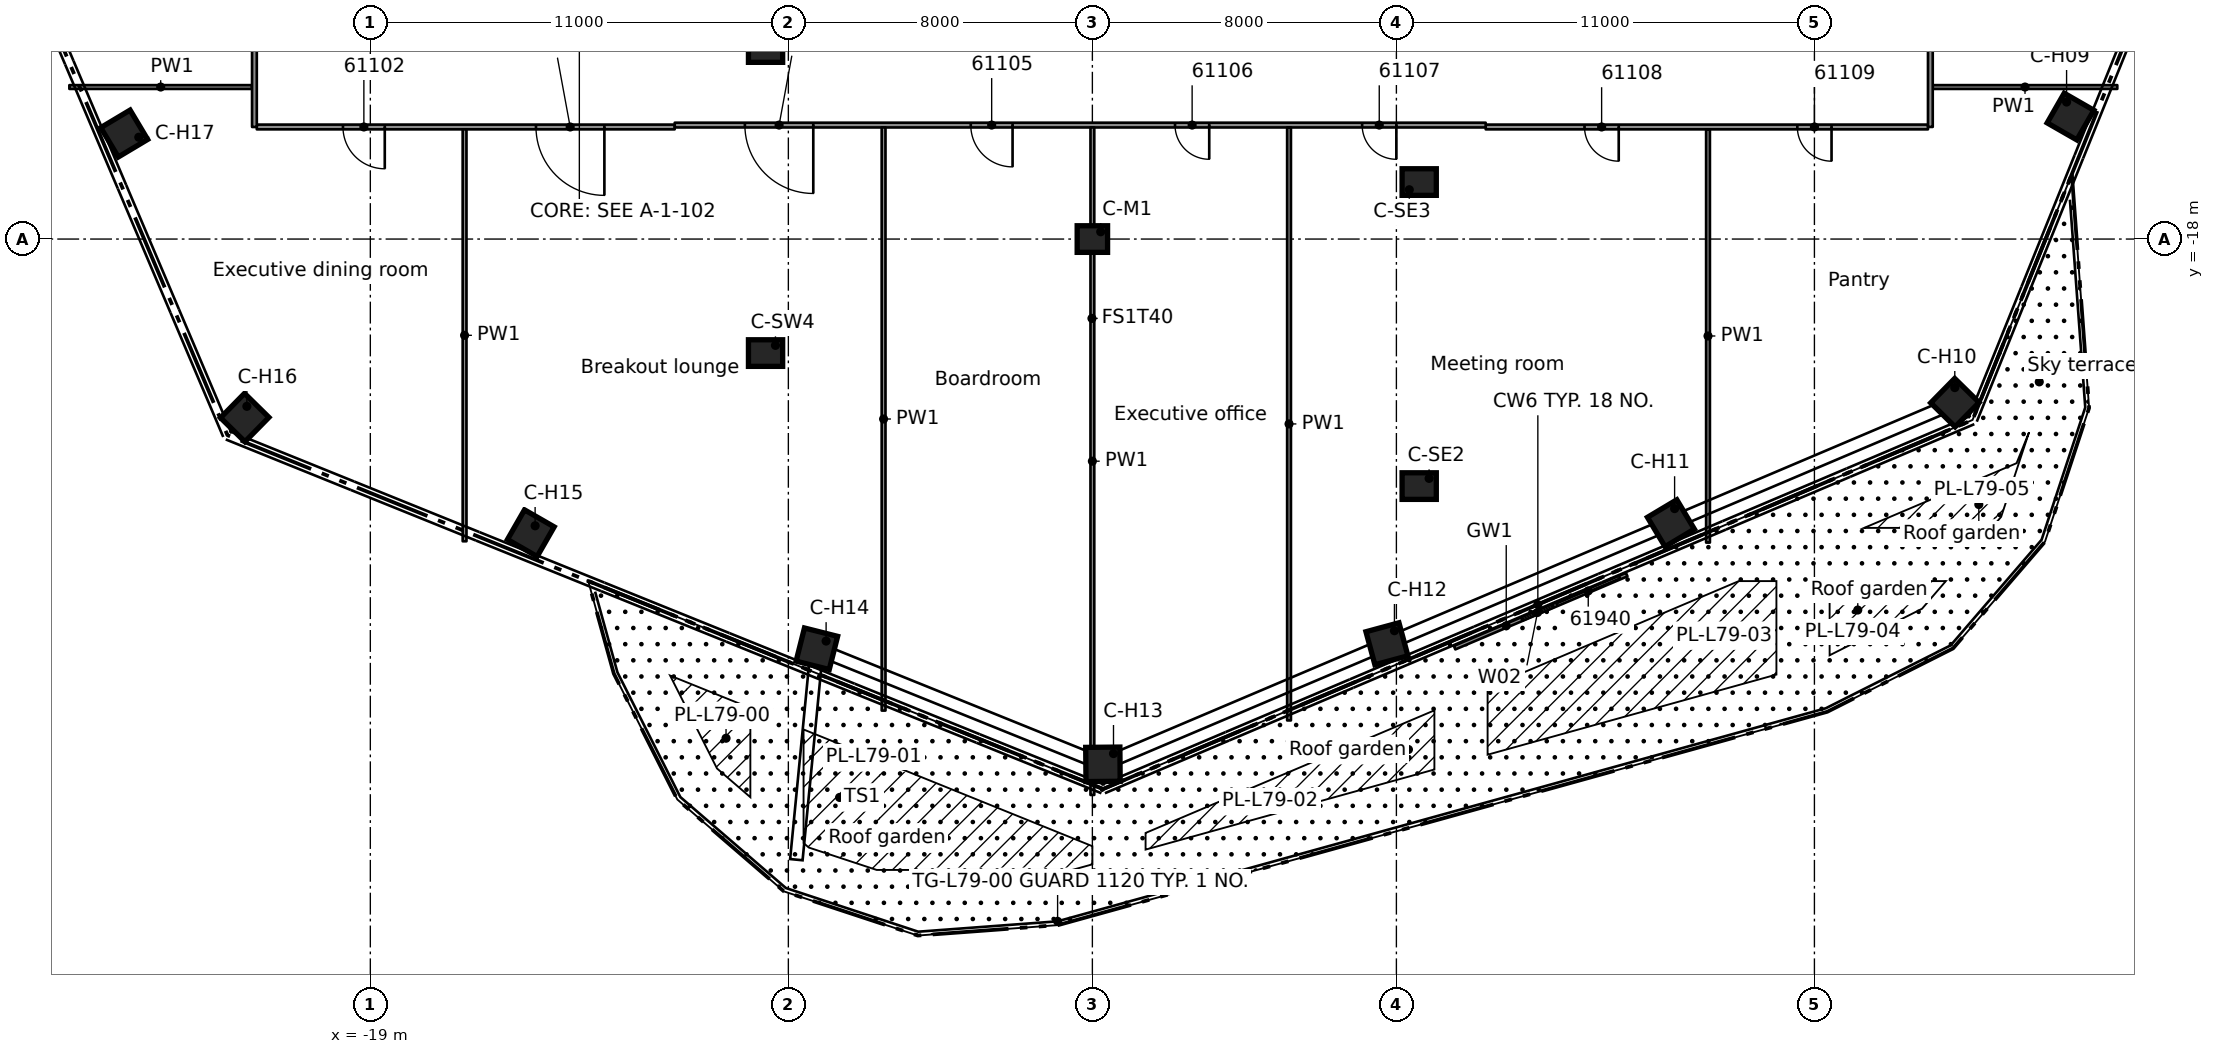
"""IFC4 building model, lengths in metres.
Left out: names, types, materials, properties, quantities, classifications, styles, units other than length and angle.
Written with IfcOpenShell. Run it as: python <this file> out.ifc"""

import sys

from ifc_helpers import new_model, si_unit, direction, frame, frame_2d, origin, origin_2d, place, context, subcontext, project, spatial, rectangle, extrude, element, fill, save


model = new_model("IFC4")
c1 = context("Model", 3, precision=1e-05, world=origin(), true_north=direction((0.0, 1.0)))
c2 = subcontext(c1, "Body", "Model", "MODEL_VIEW")
j1 = project(units=[si_unit("LENGTHUNIT", "METRE"), si_unit("PLANEANGLEUNIT", "RADIAN")], contexts=[c1])
p1 = place(None, origin())
s1 = spatial("IfcSite", under=j1, at=p1, CompositionType="ELEMENT")
p2 = place(p1, origin())
s2 = spatial("IfcBuilding", under=s1, at=p2, CompositionType="ELEMENT")
p3 = place(p2, frame((0.0, 0.0, 296.4)))
s3 = spatial("IfcBuildingStorey", under=s2, at=p3, CompositionType="ELEMENT", Elevation=296.4)
for number, where, z_axis, x_axis in (
    (1, (25.739, -14.777, 0.0), (0.0, 0.0, 1.0), (0.867, -0.498, 0.0)),
    (2, (22.697, -22.305, 0.0), (0.0, 0.0, 1.0), (0.713, -0.701, 0.0)),
    (3, (15.224, -25.477, 0.0), (0.0, 0.0, 1.0), (0.513, -0.858, 0.0)),
    (4, (7.751, -28.649, 0.0), (0.0, 0.0, 1.0), (0.261, -0.965, 0.0)),
    (5, (0.278, -31.821, 0.0), (0.0, 0.0, 1.0), (0.009, -1.0, 0.0)),
    (6, (-7.25, -28.78, 0.0), (0.0, 0.0, 1.0), (-0.244, -0.97, 0.0)),
    (7, (-14.777, -25.739, 0.0), (0.0, 0.0, 1.0), (-0.498, -0.867, 0.0)),
    (8, (-22.305, -22.697, 0.0), (0.0, 0.0, 1.0), (-0.701, -0.713, 0.0)),
    (9, (-25.477, -15.224, 0.0), (0.0, 0.0, 1.0), (-0.858, -0.513, 0.0)),
):
    element("IfcColumn", number, at=place(p3, frame(where, z_axis=z_axis, x_axis=x_axis)), inside=s3, PredefinedType="COLUMN", context=c2, shape_type="SweptSolid", body=[
        extrude(rectangle(XDim=0.9, YDim=0.9, at=origin_2d()), origin(), (0.0, 0.0, 1.0), 3.5),
    ])
p4 = place(p3, frame((0.0, -18.0, 0.0), z_axis=(0.0, 0.0, 1.0), x_axis=(1.0, 0.0, 0.0)))
e10 = element("IfcColumn", 10, at=p4, inside=s3, PredefinedType="COLUMN", context=c2, shape_type="SweptSolid", body=[
    extrude(rectangle(XDim=0.8, YDim=0.7, at=origin_2d()), origin(), (0.0, 0.0, 1.0), 3.5),
])
for number, where, z_axis, x_axis in (
    (11, (8.6, -24.5, 0.0), (0.0, 0.0, 1.0), (1.0, 0.0, 0.0)),
    (12, (8.6, -16.5, 0.0), (0.0, 0.0, 1.0), (1.0, 0.0, 0.0)),
    (13, (-8.6, -13.0, 0.0), (0.0, 0.0, 1.0), (1.0, 0.0, 0.0)),
    (14, (-8.6, -21.0, 0.0), (0.0, 0.0, 1.0), (1.0, 0.0, 0.0)),
):
    element("IfcColumn", number, at=place(p3, frame(where, z_axis=z_axis, x_axis=x_axis)), inside=s3, PredefinedType="COLUMN", context=c2, shape_type="SweptSolid", body=[
        extrude(rectangle(XDim=0.9, YDim=0.7, at=origin_2d()), origin(), (0.0, 0.0, 1.0), 3.5),
    ])
p5 = place(p3, frame((14.061, -26.829, 0.0), z_axis=(0.0, 0.0, 1.0), x_axis=(-0.920509872574, -0.390719303968, 0.0)))
e15 = element("IfcWall", 15, at=p5, inside=s3, PredefinedType="STANDARD", context=c2, shape_type="SweptSolid", body=[
    extrude(rectangle(XDim=4.921, YDim=0.1, at=frame_2d((2.46, 0.0))), origin(), (0.0, 0.0, 1.0), 3.05),
])
p6 = place(p5, frame((0.2, 0.0, 0.0)))
e16 = element("IfcOpeningElement", 16, at=p6, cuts=e15, PredefinedType="OPENING", context=c2, shape_type="SweptSolid", body=[
    extrude(rectangle(XDim=1.8, YDim=2.4, at=frame_2d((0.9, 1.2))), frame((0.0, 0.06, 0.0), z_axis=(0.0, -1.0, 0.0), x_axis=(1.0, 0.0, 0.0)), (0.0, 0.0, 1.0), 0.12),
])
p7 = place(p5, frame((2.1, 0.0, 0.0)))
e17 = element("IfcOpeningElement", 17, at=p7, cuts=e15, PredefinedType="OPENING", context=c2, shape_type="SweptSolid", body=[
    extrude(rectangle(XDim=0.9, YDim=2.4, at=frame_2d((0.45, 1.2))), frame((0.0, 0.06, 0.0), z_axis=(0.0, -1.0, 0.0), x_axis=(1.0, 0.0, 0.0)), (0.0, 0.0, 1.0), 0.12),
])
p8 = place(p3, frame((-10.991, -15.051, 0.0), z_axis=(0.0, 0.0, 1.0), x_axis=(-1.0, 0.0, 0.0)))
e18 = element("IfcWall", 18, at=p8, inside=s3, PredefinedType="PARTITIONING", context=c2, shape_type="SweptSolid", body=[
    extrude(rectangle(XDim=10.997, YDim=0.125, at=frame_2d((5.499, 0.0))), origin(), (0.0, 0.0, 1.0), 3.03),
])
p9 = place(p8, frame((7.629, 0.0, 0.0)))
e19 = element("IfcOpeningElement", 19, at=p9, cuts=e18, PredefinedType="OPENING", context=c2, shape_type="SweptSolid", body=[
    extrude(rectangle(XDim=1.1, YDim=2.1, at=frame_2d((0.55, 1.05))), frame((0.0, 0.073, 0.0), z_axis=(0.0, -1.0, 0.0), x_axis=(1.0, 0.0, 0.0)), (0.0, 0.0, 1.0), 0.145),
])
p10 = place(p8, frame((1.85, 0.0, 0.0)))
e20 = element("IfcOpeningElement", 20, at=p10, cuts=e18, PredefinedType="OPENING", context=c2, shape_type="SweptSolid", body=[
    extrude(rectangle(XDim=1.8, YDim=2.1, at=frame_2d((0.9, 1.05))), frame((0.0, 0.073, 0.0), z_axis=(0.0, -1.0, 0.0), x_axis=(1.0, 0.0, 0.0)), (0.0, 0.0, 1.0), 0.145),
])
p11 = place(p3, frame((21.988, -15.051, 0.0), z_axis=(0.0, 0.0, 1.0), x_axis=(-1.0, 0.0, 0.0)))
e21 = element("IfcWall", 21, at=p11, inside=s3, PredefinedType="PARTITIONING", context=c2, shape_type="SweptSolid", body=[
    extrude(rectangle(XDim=11.638, YDim=0.125, at=frame_2d((5.819, 0.0))), origin(), (0.0, 0.0, 1.0), 3.03),
])
p12 = place(p11, frame((8.137, 0.0, 0.0)))
e22 = element("IfcOpeningElement", 22, at=p12, cuts=e21, PredefinedType="OPENING", context=c2, shape_type="SweptSolid", body=[
    extrude(rectangle(XDim=0.9, YDim=2.1, at=frame_2d((0.45, 1.05))), frame((0.0, 0.073, 0.0), z_axis=(0.0, -1.0, 0.0), x_axis=(1.0, 0.0, 0.0)), (0.0, 0.0, 1.0), 0.145),
])
p13 = place(p11, frame((2.538, 0.0, 0.0)))
e23 = element("IfcOpeningElement", 23, at=p13, cuts=e21, PredefinedType="OPENING", context=c2, shape_type="SweptSolid", body=[
    extrude(rectangle(XDim=0.9, YDim=2.1, at=frame_2d((0.45, 1.05))), frame((0.0, 0.073, 0.0), z_axis=(0.0, -1.0, 0.0), x_axis=(1.0, 0.0, 0.0)), (0.0, 0.0, 1.0), 0.145),
])
p14 = place(p3, frame((10.349, -15.001, 0.0), z_axis=(0.0, 0.0, 1.0), x_axis=(-1.0, 0.0, 0.0)))
e24 = element("IfcWall", 24, at=p14, inside=s3, PredefinedType="PARTITIONING", context=c2, shape_type="SweptSolid", body=[
    extrude(rectangle(XDim=21.339, YDim=0.125, at=frame_2d((10.669, 0.0))), origin(), (0.0, 0.0, 1.0), 3.03),
])
p15 = place(p14, frame((17.693, 0.0, 0.0)))
e25 = element("IfcOpeningElement", 25, at=p15, cuts=e24, PredefinedType="OPENING", context=c2, shape_type="SweptSolid", body=[
    extrude(rectangle(XDim=1.8, YDim=2.1, at=frame_2d((0.9, 1.05))), frame((0.0, 0.073, 0.0), z_axis=(0.0, -1.0, 0.0), x_axis=(1.0, 0.0, 0.0)), (0.0, 0.0, 1.0), 0.145),
])
p16 = place(p14, frame((12.449, 0.0, 0.0)))
e26 = element("IfcOpeningElement", 26, at=p16, cuts=e24, PredefinedType="OPENING", context=c2, shape_type="SweptSolid", body=[
    extrude(rectangle(XDim=1.1, YDim=2.1, at=frame_2d((0.55, 1.05))), frame((0.0, 0.073, 0.0), z_axis=(0.0, -1.0, 0.0), x_axis=(1.0, 0.0, 0.0)), (0.0, 0.0, 1.0), 0.145),
])
p17 = place(p14, frame((7.274, 0.0, 0.0)))
e27 = element("IfcOpeningElement", 27, at=p17, cuts=e24, PredefinedType="OPENING", context=c2, shape_type="SweptSolid", body=[
    extrude(rectangle(XDim=0.9, YDim=2.1, at=frame_2d((0.45, 1.05))), frame((0.0, 0.073, 0.0), z_axis=(0.0, -1.0, 0.0), x_axis=(1.0, 0.0, 0.0)), (0.0, 0.0, 1.0), 0.145),
])
p18 = place(p14, frame((2.35, 0.0, 0.0)))
e28 = element("IfcOpeningElement", 28, at=p18, cuts=e24, PredefinedType="OPENING", context=c2, shape_type="SweptSolid", body=[
    extrude(rectangle(XDim=0.9, YDim=2.1, at=frame_2d((0.45, 1.05))), frame((0.0, 0.073, 0.0), z_axis=(0.0, -1.0, 0.0), x_axis=(1.0, 0.0, 0.0)), (0.0, 0.0, 1.0), 0.145),
])
p19 = place(p3, frame((-26.92, -14.0, 0.0), z_axis=(0.0, 0.0, 1.0), x_axis=(1.0, 0.0, 0.0)))
e29 = element("IfcWall", 29, at=p19, inside=s3, PredefinedType="PARTITIONING", context=c2, shape_type="SweptSolid", body=[
    extrude(rectangle(XDim=4.807, YDim=0.1, at=frame_2d((2.403, 0.0))), origin(), (0.0, 0.0, 1.0), 3.03),
])
p20 = place(p3, frame((22.113, -14.0, 0.0), z_axis=(0.0, 0.0, 1.0), x_axis=(1.0, 0.0, 0.0)))
e30 = element("IfcWall", 30, at=p20, inside=s3, PredefinedType="PARTITIONING", context=c2, shape_type="SweptSolid", body=[
    extrude(rectangle(XDim=4.857, YDim=0.1, at=frame_2d((2.428, 0.0))), origin(), (0.0, 0.0, 1.0), 3.03),
])
p21 = place(p3, frame((22.051, 15.05, 0.0), z_axis=(0.0, 0.0, 1.0), x_axis=(0.0, -1.0, 0.0)))
e31 = element("IfcWall", 31, at=p21, inside=s3, PredefinedType="PARTITIONING", context=c2, shape_type="SweptSolid", body=[
    extrude(rectangle(XDim=30.1, YDim=0.125, at=frame_2d((15.05, 0.0))), origin(), (0.0, 0.0, 1.0), 3.03),
])
p22 = place(p21, frame((25.426, 0.0, 0.0)))
e32 = element("IfcOpeningElement", 32, at=p22, cuts=e31, PredefinedType="OPENING", context=c2, shape_type="SweptSolid", body=[
    extrude(rectangle(XDim=1.1, YDim=2.1, at=frame_2d((0.55, 1.05))), frame((0.0, 0.073, 0.0), z_axis=(0.0, -1.0, 0.0), x_axis=(1.0, 0.0, 0.0)), (0.0, 0.0, 1.0), 0.145),
])
p23 = place(p21, frame((18.65, 0.0, 0.0)))
e33 = element("IfcOpeningElement", 33, at=p23, cuts=e31, PredefinedType="OPENING", context=c2, shape_type="SweptSolid", body=[
    extrude(rectangle(XDim=0.9, YDim=2.1, at=frame_2d((0.45, 1.05))), frame((0.0, 0.073, 0.0), z_axis=(0.0, -1.0, 0.0), x_axis=(1.0, 0.0, 0.0)), (0.0, 0.0, 1.0), 0.145),
])
p24 = place(p21, frame((10.124, 0.0, 0.0)))
e34 = element("IfcOpeningElement", 34, at=p24, cuts=e31, PredefinedType="OPENING", context=c2, shape_type="SweptSolid", body=[
    extrude(rectangle(XDim=1.8, YDim=2.1, at=frame_2d((0.9, 1.05))), frame((0.0, 0.073, 0.0), z_axis=(0.0, -1.0, 0.0), x_axis=(1.0, 0.0, 0.0)), (0.0, 0.0, 1.0), 0.145),
])
p25 = place(p21, frame((3.65, 0.0, 0.0)))
e35 = element("IfcOpeningElement", 35, at=p25, cuts=e31, PredefinedType="OPENING", context=c2, shape_type="SweptSolid", body=[
    extrude(rectangle(XDim=1.0, YDim=2.1, at=frame_2d((0.5, 1.05))), frame((0.0, 0.073, 0.0), z_axis=(0.0, -1.0, 0.0), x_axis=(1.0, 0.0, 0.0)), (0.0, 0.0, 1.0), 0.145),
])
p26 = place(p3, frame((16.2, -25.987, 0.0), z_axis=(0.0, 0.0, 1.0), x_axis=(0.0, 1.0, 0.0)))
e36 = element("IfcWall", 36, at=p26, inside=s3, PredefinedType="PARTITIONING", context=c2, shape_type="SweptSolid", body=[
    extrude(rectangle(XDim=10.873, YDim=0.1, at=frame_2d((5.437, 0.0))), origin(), (0.0, 0.0, 1.0), 3.03),
])
p27 = place(p3, frame((5.175, -30.666, 0.0), z_axis=(0.0, 0.0, 1.0), x_axis=(0.0, 1.0, 0.0)))
e37 = element("IfcWall", 37, at=p27, inside=s3, PredefinedType="PARTITIONING", context=c2, shape_type="SweptSolid", body=[
    extrude(rectangle(XDim=15.603, YDim=0.1, at=frame_2d((7.802, 0.0))), origin(), (0.0, 0.0, 1.0), 3.03),
])
p28 = place(p3, frame((0.0, -32.627, 0.0), z_axis=(0.0, 0.0, 1.0), x_axis=(0.0, 1.0, 0.0)))
e38 = element("IfcWall", 38, at=p28, inside=s3, PredefinedType="PARTITIONING", context=c2, shape_type="SweptSolid", body=[
    extrude(rectangle(XDim=17.564, YDim=0.1, at=frame_2d((8.782, 0.0))), origin(), (0.0, 0.0, 1.0), 3.03),
])
p29 = place(p3, frame((-5.494, -30.407, 0.0), z_axis=(0.0, 0.0, 1.0), x_axis=(0.0, 1.0, 0.0)))
e39 = element("IfcWall", 39, at=p29, inside=s3, PredefinedType="PARTITIONING", context=c2, shape_type="SweptSolid", body=[
    extrude(rectangle(XDim=15.344, YDim=0.1, at=frame_2d((7.672, 0.0))), origin(), (0.0, 0.0, 1.0), 3.03),
])
p30 = place(p3, frame((-16.52, -25.952, 0.0), z_axis=(0.0, 0.0, 1.0), x_axis=(0.0, 1.0, 0.0)))
e40 = element("IfcWall", 40, at=p30, inside=s3, PredefinedType="PARTITIONING", context=c2, shape_type="SweptSolid", body=[
    extrude(rectangle(XDim=10.838, YDim=0.1, at=frame_2d((5.419, 0.0))), origin(), (0.0, 0.0, 1.0), 3.03),
])
p31 = place(p3, frame((-22.05, -15.051, 0.0), z_axis=(0.0, 0.0, 1.0), x_axis=(0.0, 1.0, 0.0)))
e41 = element("IfcWall", 41, at=p31, inside=s3, PredefinedType="PARTITIONING", context=c2, shape_type="SweptSolid", body=[
    extrude(rectangle(XDim=30.102, YDim=0.125, at=frame_2d((15.051, 0.0))), origin(), (0.0, 0.0, 1.0), 3.03),
])
p32 = place(p31, frame((14.625, 0.0, 0.0)))
e42 = element("IfcOpeningElement", 42, at=p32, cuts=e41, PredefinedType="OPENING", context=c2, shape_type="SweptSolid", body=[
    extrude(rectangle(XDim=0.9, YDim=2.1, at=frame_2d((0.45, 1.05))), frame((0.0, 0.073, 0.0), z_axis=(0.0, -1.0, 0.0), x_axis=(1.0, 0.0, 0.0)), (0.0, 0.0, 1.0), 0.145),
])
p33 = place(p31, frame((3.651, 0.0, 0.0)))
e43 = element("IfcOpeningElement", 43, at=p33, cuts=e41, PredefinedType="OPENING", context=c2, shape_type="SweptSolid", body=[
    extrude(rectangle(XDim=0.9, YDim=2.1, at=frame_2d((0.45, 1.05))), frame((0.0, 0.073, 0.0), z_axis=(0.0, -1.0, 0.0), x_axis=(1.0, 0.0, 0.0)), (0.0, 0.0, 1.0), 0.145),
])
p34 = place(p31, frame((25.677, 0.0, 0.0)))
e44 = element("IfcOpeningElement", 44, at=p34, cuts=e41, PredefinedType="OPENING", context=c2, shape_type="SweptSolid", body=[
    extrude(rectangle(XDim=0.9, YDim=2.1, at=frame_2d((0.45, 1.05))), frame((0.0, 0.073, 0.0), z_axis=(0.0, -1.0, 0.0), x_axis=(1.0, 0.0, 0.0)), (0.0, 0.0, 1.0), 0.145),
])
p35 = place(p6, origin())
e45 = element("IfcDoor", 45, at=p35, inside=s3, OperationType="DOUBLE_DOOR_SLIDING", PredefinedType="DOOR", context=c2, shape_type="SweptSolid", body=[
    extrude(rectangle(XDim=1.8, YDim=2.4, at=frame_2d((0.9, 1.2))), frame((0.0, 0.025, 0.0), z_axis=(0.0, -1.0, 0.0), x_axis=(1.0, 0.0, 0.0)), (0.0, 0.0, 1.0), 0.05),
])
fill(e16, e45)
p36 = place(p7, origin())
e46 = element("IfcWindow", 46, at=p36, inside=s3, PartitioningType="SINGLE_PANEL", PredefinedType="WINDOW", context=c2, shape_type="SweptSolid", body=[
    extrude(rectangle(XDim=0.9, YDim=2.4, at=frame_2d((0.45, 1.2))), frame((0.0, 0.03, 0.0), z_axis=(0.0, -1.0, 0.0), x_axis=(1.0, 0.0, 0.0)), (0.0, 0.0, 1.0), 0.06),
])
fill(e17, e46)
p37 = place(p9, origin())
e47 = element("IfcDoor", 47, at=p37, inside=s3, OperationType="SINGLE_SWING_RIGHT", PredefinedType="DOOR", context=c2, shape_type="SweptSolid", body=[
    extrude(rectangle(XDim=1.1, YDim=2.1, at=frame_2d((0.55, 1.05))), frame((0.0, 0.025, 0.0), z_axis=(0.0, -1.0, 0.0), x_axis=(1.0, 0.0, 0.0)), (0.0, 0.0, 1.0), 0.05),
])
fill(e19, e47)
p38 = place(p10, origin())
e48 = element("IfcDoor", 48, at=p38, inside=s3, OperationType="DOUBLE_DOOR_SINGLE_SWING", PredefinedType="DOOR", context=c2, shape_type="SweptSolid", body=[
    extrude(rectangle(XDim=1.8, YDim=2.1, at=frame_2d((0.9, 1.05))), frame((0.0, 0.025, 0.0), z_axis=(0.0, -1.0, 0.0), x_axis=(1.0, 0.0, 0.0)), (0.0, 0.0, 1.0), 0.05),
])
fill(e20, e48)
p39 = place(p15, origin())
e49 = element("IfcDoor", 49, at=p39, inside=s3, OperationType="DOUBLE_DOOR_SINGLE_SWING", PredefinedType="DOOR", context=c2, shape_type="SweptSolid", body=[
    extrude(rectangle(XDim=1.8, YDim=2.1, at=frame_2d((0.9, 1.05))), frame((0.0, 0.025, 0.0), z_axis=(0.0, -1.0, 0.0), x_axis=(1.0, 0.0, 0.0)), (0.0, 0.0, 1.0), 0.05),
])
fill(e25, e49)
p40 = place(p16, origin())
e50 = element("IfcDoor", 50, at=p40, inside=s3, OperationType="SINGLE_SWING_RIGHT", PredefinedType="DOOR", context=c2, shape_type="SweptSolid", body=[
    extrude(rectangle(XDim=1.1, YDim=2.1, at=frame_2d((0.55, 1.05))), frame((0.0, 0.025, 0.0), z_axis=(0.0, -1.0, 0.0), x_axis=(1.0, 0.0, 0.0)), (0.0, 0.0, 1.0), 0.05),
])
fill(e26, e50)
p41 = place(p17, origin())
e51 = element("IfcDoor", 51, at=p41, inside=s3, OperationType="SINGLE_SWING_LEFT", PredefinedType="DOOR", context=c2, shape_type="SweptSolid", body=[
    extrude(rectangle(XDim=0.9, YDim=2.1, at=frame_2d((0.45, 1.05))), frame((0.0, 0.025, 0.0), z_axis=(0.0, -1.0, 0.0), x_axis=(1.0, 0.0, 0.0)), (0.0, 0.0, 1.0), 0.05),
])
fill(e27, e51)
p42 = place(p18, origin())
e52 = element("IfcDoor", 52, at=p42, inside=s3, OperationType="SINGLE_SWING_LEFT", PredefinedType="DOOR", context=c2, shape_type="SweptSolid", body=[
    extrude(rectangle(XDim=0.9, YDim=2.1, at=frame_2d((0.45, 1.05))), frame((0.0, 0.025, 0.0), z_axis=(0.0, -1.0, 0.0), x_axis=(1.0, 0.0, 0.0)), (0.0, 0.0, 1.0), 0.05),
])
fill(e28, e52)
p43 = place(p12, origin())
e53 = element("IfcDoor", 53, at=p43, inside=s3, OperationType="SINGLE_SWING_RIGHT", PredefinedType="DOOR", context=c2, shape_type="SweptSolid", body=[
    extrude(rectangle(XDim=0.9, YDim=2.1, at=frame_2d((0.45, 1.05))), frame((0.0, 0.025, 0.0), z_axis=(0.0, -1.0, 0.0), x_axis=(1.0, 0.0, 0.0)), (0.0, 0.0, 1.0), 0.05),
])
fill(e22, e53)
p44 = place(p13, origin())
e54 = element("IfcDoor", 54, at=p44, inside=s3, OperationType="SINGLE_SWING_LEFT", PredefinedType="DOOR", context=c2, shape_type="SweptSolid", body=[
    extrude(rectangle(XDim=0.9, YDim=2.1, at=frame_2d((0.45, 1.05))), frame((0.0, 0.025, 0.0), z_axis=(0.0, -1.0, 0.0), x_axis=(1.0, 0.0, 0.0)), (0.0, 0.0, 1.0), 0.05),
])
fill(e23, e54)
save(model, sys.argv[1])
